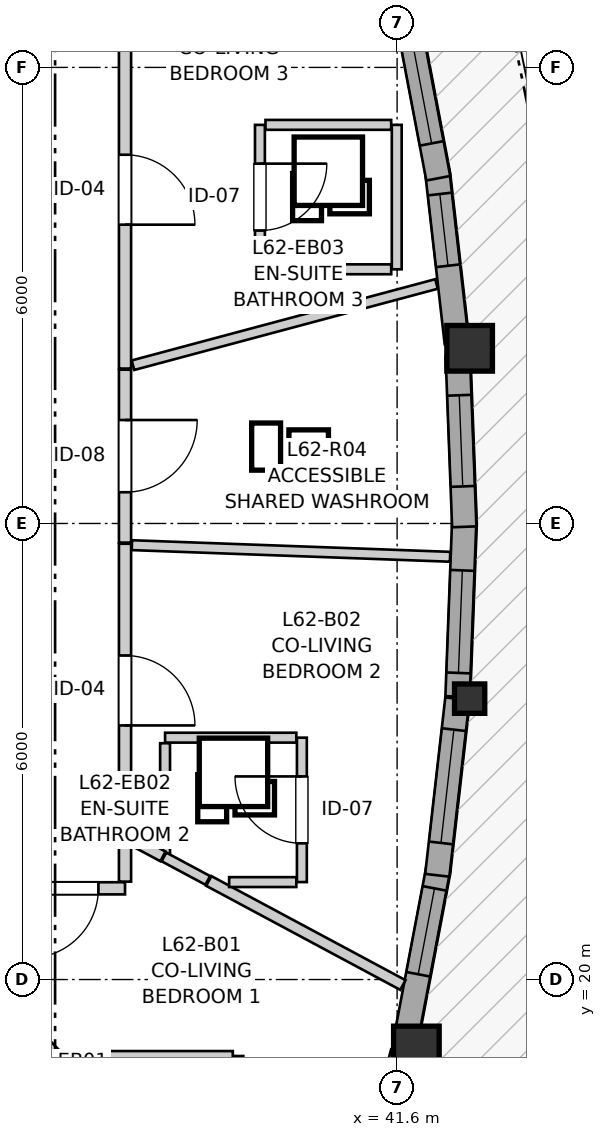
"""IFC4 building model, lengths in metres.
Left out: names, types, materials, properties, quantities, classifications, styles, units other than length and angle.
Written with IfcOpenShell. Run it as: python <this file> out.ifc"""

import sys

from ifc_helpers import new_model, si_unit, direction, frame, frame_2d, origin, origin_2d, place, context, subcontext, project, spatial, rectangle, i_section, extrude, source, transform, mapped, element, fill, save


model = new_model("IFC4")
c1 = context("Model", 3, precision=1e-05, world=origin(), true_north=direction((0.0, 1.0)))
c2 = subcontext(c1, "Body", "Model", "MODEL_VIEW")
j1 = project(units=[si_unit("LENGTHUNIT", "METRE"), si_unit("PLANEANGLEUNIT", "RADIAN")], contexts=[c1])
p1 = place(None, origin())
s1 = spatial("IfcSite", under=j1, at=p1, CompositionType="ELEMENT")
p2 = place(p1, origin())
s2 = spatial("IfcBuilding", under=s1, at=p2, CompositionType="ELEMENT")
p3 = place(p2, frame((0.0, 0.0, 208.4)))
s3 = spatial("IfcBuildingStorey", under=s2, at=p3, CompositionType="ELEMENT", Elevation=208.4)
m1 = source(origin(), c2, "Body", "SweptSolid", [
    extrude(rectangle(XDim=0.6, YDim=0.6, at=origin_2d()), origin(), (0.0, 0.0, 1.0), 2.935),
])
p4 = place(p3, frame((41.854, 19.086, 0.0), z_axis=(0.0, 0.0, 1.0), x_axis=(1.0, 0.0, 0.0)))
e1 = element("IfcColumn", 1, at=p4, inside=s3, PredefinedType="COLUMN", context=c2, shape_type="MappedRepresentation", body=[
    mapped(m1, transform((0.0, 0.0, 0.0), x_axis=(1.0, 0.0, 0.0), y_axis=(0.0, 1.0, 0.0), z_axis=(0.0, 0.0, 1.0), scale=1.0)),
])
m2 = source(origin(), c2, "Body", "SweptSolid", [
    extrude(i_section(OverallWidth=0.398, OverallDepth=0.387, WebThickness=0.019, FlangeThickness=0.03, FilletRadius=0.015, at=origin_2d()), origin(), (0.0, 0.0, 1.0), 2.935),
])
p5 = place(p3, frame((42.554, 23.696, 0.0), z_axis=(0.0, 0.0, 1.0), x_axis=(1.0, 0.0, 0.0)))
e2 = element("IfcColumn", 2, at=p5, inside=s3, PredefinedType="PILASTER", context=c2, shape_type="MappedRepresentation", body=[
    mapped(m2, transform((0.0, 0.0, 0.0), x_axis=(1.0, 0.0, 0.0), y_axis=(0.0, 1.0, 0.0), z_axis=(0.0, 0.0, 1.0), scale=1.0)),
])
p6 = place(p3, frame((42.554, 28.304, 0.0), z_axis=(0.0, 0.0, 1.0), x_axis=(1.0, 0.0, 0.0)))
e3 = element("IfcColumn", 3, at=p6, inside=s3, PredefinedType="COLUMN", context=c2, shape_type="MappedRepresentation", body=[
    mapped(m1, transform((0.0, 0.0, 0.0), x_axis=(1.0, 0.0, 0.0), y_axis=(0.0, 1.0, 0.0), z_axis=(0.0, 0.0, 1.0), scale=1.0)),
])
p7 = place(p3, frame((41.076, 16.786, 0.0), z_axis=(0.0, 0.0, 1.0), x_axis=(0.257037260973, 0.966401493413, 0.0)))
e4 = element("IfcWall", 4, at=p7, inside=s3, PredefinedType="SOLIDWALL", context=c2, shape_type="SweptSolid", body=[
    extrude(rectangle(XDim=2.333, YDim=0.32, at=frame_2d((1.167, 0.0))), origin(), (0.0, 0.0, 1.0), 2.555),
])
p8 = place(p7, frame((0.446, 0.0, 0.82)))
e5 = element("IfcOpeningElement", 5, at=p8, cuts=e4, PredefinedType="OPENING", context=c2, shape_type="SweptSolid", body=[
    extrude(rectangle(XDim=1.45, YDim=1.25, at=frame_2d((0.725, 0.625))), frame((0.0, 0.17, 0.0), z_axis=(0.0, -1.0, 0.0), x_axis=(1.0, 0.0, 0.0)), (0.0, 0.0, 1.0), 0.34),
])
p9 = place(p3, frame((41.713, 19.205, 0.0), z_axis=(0.0, 0.0, 1.0), x_axis=(0.186691464441, 0.982418595663, 0.0)))
e6 = element("IfcWall", 6, at=p9, inside=s3, PredefinedType="SOLIDWALL", context=c2, shape_type="SweptSolid", body=[
    extrude(rectangle(XDim=2.294, YDim=0.32, at=frame_2d((1.147, 0.0))), origin(), (0.0, 0.0, 1.0), 2.555),
])
p10 = place(p9, frame((0.88, 0.0, 0.82)))
e7 = element("IfcOpeningElement", 7, at=p10, cuts=e6, PredefinedType="OPENING", context=c2, shape_type="SweptSolid", body=[
    extrude(rectangle(XDim=1.15, YDim=1.2, at=frame_2d((0.575, 0.6))), frame((0.0, 0.17, 0.0), z_axis=(0.0, -1.0, 0.0), x_axis=(1.0, 0.0, 0.0)), (0.0, 0.0, 1.0), 0.34),
])
p11 = place(p3, frame((42.128, 21.371, 0.0), z_axis=(0.0, 0.0, 1.0), x_axis=(0.113319777802, 0.993558567956, 0.0)))
e8 = element("IfcWall", 8, at=p11, inside=s3, PredefinedType="SOLIDWALL", context=c2, shape_type="SweptSolid", body=[
    extrude(rectangle(XDim=2.338, YDim=0.32, at=frame_2d((1.169, 0.0))), origin(), (0.0, 0.0, 1.0), 2.555),
])
p12 = place(p11, frame((0.429, 0.0, 0.82)))
e9 = element("IfcOpeningElement", 9, at=p12, cuts=e8, PredefinedType="OPENING", context=c2, shape_type="SweptSolid", body=[
    extrude(rectangle(XDim=1.5, YDim=1.45, at=frame_2d((0.75, 0.725))), frame((0.0, 0.17, 0.0), z_axis=(0.0, -1.0, 0.0), x_axis=(1.0, 0.0, 0.0)), (0.0, 0.0, 1.0), 0.34),
])
p13 = place(p3, frame((42.395, 23.722, 0.0), z_axis=(0.0, 0.0, 1.0), x_axis=(0.038025668885, 0.999276762717, 0.0)))
e10 = element("IfcWall", 10, at=p13, inside=s3, PredefinedType="SOLIDWALL", context=c2, shape_type="SweptSolid", body=[
    extrude(rectangle(XDim=2.324, YDim=0.32, at=frame_2d((1.162, 0.0))), origin(), (0.0, 0.0, 1.0), 2.555),
])
p14 = place(p13, frame((0.312, 0.0, 0.82)))
e11 = element("IfcOpeningElement", 11, at=p14, cuts=e10, PredefinedType="OPENING", context=c2, shape_type="SweptSolid", body=[
    extrude(rectangle(XDim=1.35, YDim=1.45, at=frame_2d((0.675, 0.725))), frame((0.0, 0.17, 0.0), z_axis=(0.0, -1.0, 0.0), x_axis=(1.0, 0.0, 0.0)), (0.0, 0.0, 1.0), 0.34),
])
p15 = place(p3, frame((42.483, 25.956, 0.0), z_axis=(0.0, 0.0, 1.0), x_axis=(-0.038013039165, 0.999277243238, 0.0)))
e12 = element("IfcWall", 12, at=p15, inside=s3, PredefinedType="SOLIDWALL", context=c2, shape_type="SweptSolid", body=[
    extrude(rectangle(XDim=2.254, YDim=0.32, at=frame_2d((1.127, 0.0))), origin(), (0.0, 0.0, 1.0), 2.555),
])
p16 = place(p15, frame((0.532, 0.0, 0.82)))
e13 = element("IfcOpeningElement", 13, at=p16, cuts=e12, PredefinedType="OPENING", context=c2, shape_type="SweptSolid", body=[
    extrude(rectangle(XDim=1.2, YDim=1.45, at=frame_2d((0.6, 0.725))), frame((0.0, 0.17, 0.0), z_axis=(0.0, -1.0, 0.0), x_axis=(1.0, 0.0, 0.0)), (0.0, 0.0, 1.0), 0.34),
])
p17 = place(p3, frame((42.385, 28.376, 0.0), z_axis=(0.0, 0.0, 1.0), x_axis=(-0.113267221285, 0.993564560853, 0.0)))
e14 = element("IfcWall", 14, at=p17, inside=s3, PredefinedType="SOLIDWALL", context=c2, shape_type="SweptSolid", body=[
    extrude(rectangle(XDim=2.268, YDim=0.32, at=frame_2d((1.134, 0.0))), origin(), (0.0, 0.0, 1.0), 2.555),
])
p18 = place(p17, frame((1.021, 0.0, 0.82)))
e15 = element("IfcOpeningElement", 15, at=p18, cuts=e14, PredefinedType="OPENING", context=c2, shape_type="SweptSolid", body=[
    extrude(rectangle(XDim=0.95, YDim=1.35, at=frame_2d((0.475, 0.675))), frame((0.0, 0.17, 0.0), z_axis=(0.0, -1.0, 0.0), x_axis=(1.0, 0.0, 0.0)), (0.0, 0.0, 1.0), 0.34),
])
p19 = place(p3, frame((42.141, 30.542, 0.0), z_axis=(0.0, 0.0, 1.0), x_axis=(-0.186632734065, 0.982429754525, 0.0)))
e16 = element("IfcWall", 16, at=p19, inside=s3, PredefinedType="SOLIDWALL", context=c2, shape_type="SweptSolid", body=[
    extrude(rectangle(XDim=2.364, YDim=0.32, at=frame_2d((1.182, 0.0))), origin(), (0.0, 0.0, 1.0), 2.555),
])
p20 = place(p19, frame((0.467, 0.0, 0.82)))
e17 = element("IfcOpeningElement", 17, at=p20, cuts=e16, PredefinedType="OPENING", context=c2, shape_type="SweptSolid", body=[
    extrude(rectangle(XDim=1.45, YDim=1.25, at=frame_2d((0.725, 0.625))), frame((0.0, 0.17, 0.0), z_axis=(0.0, -1.0, 0.0), x_axis=(1.0, 0.0, 0.0)), (0.0, 0.0, 1.0), 0.34),
])
p21 = place(p3, frame((38.02, 32.748, 0.0), z_axis=(0.0, 0.0, 1.0), x_axis=(0.0, -1.0, 0.0)))
e18 = element("IfcWall", 18, at=p21, inside=s3, PredefinedType="PARTITIONING", context=c2, shape_type="SweptSolid", body=[
    extrude(rectangle(XDim=4.71, YDim=0.16, at=frame_2d((2.355, 0.0))), origin(), (0.0, 0.0, 1.0), 2.603),
])
p22 = place(p21, frame((1.897, 0.0, 0.0)))
e19 = element("IfcOpeningElement", 19, at=p22, cuts=e18, PredefinedType="OPENING", context=c2, shape_type="SweptSolid", body=[
    extrude(rectangle(XDim=0.92, YDim=2.1, at=frame_2d((0.46, 1.05))), frame((0.0, 0.09, 0.0), z_axis=(0.0, -1.0, 0.0), x_axis=(1.0, 0.0, 0.0)), (0.0, 0.0, 1.0), 0.18),
])
p23 = place(p3, frame((38.02, 25.733, 0.0), z_axis=(0.0, 0.0, 1.0), x_axis=(0.0, -1.0, 0.0)))
e20 = element("IfcWall", 20, at=p23, inside=s3, PredefinedType="PARTITIONING", context=c2, shape_type="SweptSolid", body=[
    extrude(rectangle(XDim=3.862, YDim=0.16, at=frame_2d((1.931, 0.0))), origin(), (0.0, 0.0, 1.0), 2.935),
])
p24 = place(p23, frame((1.47, 0.0, 0.0)))
e21 = element("IfcOpeningElement", 21, at=p24, cuts=e20, PredefinedType="OPENING", context=c2, shape_type="SweptSolid", body=[
    extrude(rectangle(XDim=0.92, YDim=2.1, at=frame_2d((0.46, 1.05))), frame((0.0, 0.09, 0.0), z_axis=(0.0, -1.0, 0.0), x_axis=(1.0, 0.0, 0.0)), (0.0, 0.0, 1.0), 0.18),
])
p25 = place(p3, frame((38.02, 28.023, 0.0), z_axis=(0.0, 0.0, 1.0), x_axis=(0.0, -1.0, 0.0)))
e22 = element("IfcWall", 22, at=p25, inside=s3, PredefinedType="PARTITIONING", context=c2, shape_type="SweptSolid", body=[
    extrude(rectangle(XDim=2.275, YDim=0.16, at=frame_2d((1.137, 0.0))), origin(), (0.0, 0.0, 1.0), 2.935),
])
p26 = place(p25, frame((0.662, 0.0, 0.0)))
e23 = element("IfcOpeningElement", 23, at=p26, cuts=e22, PredefinedType="OPENING", context=c2, shape_type="SweptSolid", body=[
    extrude(rectangle(XDim=0.95, YDim=2.1, at=frame_2d((0.475, 1.05))), frame((0.0, 0.09, 0.0), z_axis=(0.0, -1.0, 0.0), x_axis=(1.0, 0.0, 0.0)), (0.0, 0.0, 1.0), 0.18),
])
p27 = place(p3, frame((39.511, 17.094, 0.0), z_axis=(0.0, 0.0, 1.0), x_axis=(0.0, 1.0, 0.0)))
e24 = element("IfcWall", 24, at=p27, inside=s3, PredefinedType="PARTITIONING", context=c2, shape_type="SweptSolid", body=[
    extrude(rectangle(XDim=1.9, YDim=0.13, at=frame_2d((0.95, 0.0))), origin(), (0.0, 0.0, 1.0), 2.935),
])
p28 = place(p27, frame((0.51, 0.0, 0.0)))
e25 = element("IfcOpeningElement", 25, at=p28, cuts=e24, PredefinedType="OPENING", context=c2, shape_type="SweptSolid", body=[
    extrude(rectangle(XDim=0.88, YDim=2.05, at=frame_2d((0.44, 1.025))), frame((0.0, 0.075, 0.0), z_axis=(0.0, -1.0, 0.0), x_axis=(1.0, 0.0, 0.0)), (0.0, 0.0, 1.0), 0.15),
])
p29 = place(p3, frame((40.347, 21.282, 0.0), z_axis=(0.0, 0.0, 1.0), x_axis=(0.0, 1.0, 0.0)))
e26 = element("IfcWall", 26, at=p29, inside=s3, PredefinedType="PARTITIONING", context=c2, shape_type="SweptSolid", body=[
    extrude(rectangle(XDim=1.9, YDim=0.13, at=frame_2d((0.95, 0.0))), origin(), (0.0, 0.0, 1.0), 2.573),
])
p30 = place(p29, frame((0.51, 0.0, 0.0)))
e27 = element("IfcOpeningElement", 27, at=p30, cuts=e26, PredefinedType="OPENING", context=c2, shape_type="SweptSolid", body=[
    extrude(rectangle(XDim=0.88, YDim=2.05, at=frame_2d((0.44, 1.025))), frame((0.0, 0.075, 0.0), z_axis=(0.0, -1.0, 0.0), x_axis=(1.0, 0.0, 0.0)), (0.0, 0.0, 1.0), 0.15),
])
p31 = place(p3, frame((39.795, 31.244, 0.0), z_axis=(0.0, 0.0, 1.0), x_axis=(0.0, -1.0, 0.0)))
e28 = element("IfcWall", 28, at=p31, inside=s3, PredefinedType="PARTITIONING", context=c2, shape_type="SweptSolid", body=[
    extrude(rectangle(XDim=1.9, YDim=0.13, at=frame_2d((0.95, 0.0))), origin(), (0.0, 0.0, 1.0), 2.573),
])
p32 = place(p31, frame((0.51, 0.0, 0.0)))
e29 = element("IfcOpeningElement", 29, at=p32, cuts=e28, PredefinedType="OPENING", context=c2, shape_type="SweptSolid", body=[
    extrude(rectangle(XDim=0.88, YDim=2.05, at=frame_2d((0.44, 1.025))), frame((0.0, 0.075, 0.0), z_axis=(0.0, -1.0, 0.0), x_axis=(1.0, 0.0, 0.0)), (0.0, 0.0, 1.0), 0.15),
])
p33 = place(p3, frame((38.02, 21.2, 0.0), z_axis=(0.0, 0.0, 1.0), x_axis=(-1.0, 0.0, 0.0)))
e30 = element("IfcWall", 30, at=p33, inside=s3, PredefinedType="PARTITIONING", context=c2, shape_type="SweptSolid", body=[
    extrude(rectangle(XDim=1.612, YDim=0.16, at=frame_2d((0.806, 0.0))), origin(), (0.0, 0.0, 1.0), 2.935),
])
p34 = place(p33, frame((0.35, 0.0, 0.0)))
e31 = element("IfcOpeningElement", 31, at=p34, cuts=e30, PredefinedType="OPENING", context=c2, shape_type="SweptSolid", body=[
    extrude(rectangle(XDim=0.92, YDim=2.1, at=frame_2d((0.46, 1.05))), frame((0.0, 0.09, 0.0), z_axis=(0.0, -1.0, 0.0), x_axis=(1.0, 0.0, 0.0)), (0.0, 0.0, 1.0), 0.18),
])
p35 = place(p3, frame((38.11, 25.715, 0.0), z_axis=(0.0, 0.0, 1.0), x_axis=(0.99933433165, -0.036481414253, 0.0)))
e32 = element("IfcWall", 32, at=p35, inside=s3, PredefinedType="PARTITIONING", context=c2, shape_type="SweptSolid", body=[
    extrude(rectangle(XDim=4.189, YDim=0.13, at=frame_2d((2.095, 0.0))), origin(), (0.0, 0.0, 1.0), 2.935),
])
p36 = place(p3, frame((38.125, 28.082, 0.0), z_axis=(0.0, 0.0, 1.0), x_axis=(0.965997321458, 0.258552073934, 0.0)))
e33 = element("IfcWall", 33, at=p36, inside=s3, PredefinedType="PARTITIONING", context=c2, shape_type="SweptSolid", body=[
    extrude(rectangle(XDim=4.134, YDim=0.13, at=frame_2d((2.067, 0.0))), origin(), (0.0, 0.0, 1.0), 2.935),
])
p37 = place(p3, frame((39.122, 21.297, 0.0), z_axis=(0.0, 0.0, 1.0), x_axis=(0.881308328415, -0.472541670402, 0.0)))
e34 = element("IfcWall", 34, at=p37, inside=s3, PredefinedType="PARTITIONING", context=c2, shape_type="SweptSolid", body=[
    extrude(rectangle(XDim=2.898, YDim=0.145, at=frame_2d((1.449, 0.0))), origin(), (0.0, 0.0, 1.0), 2.935),
])
p38 = place(p3, frame((36.458, 19.686, 0.0), z_axis=(0.0, 0.0, 1.0), x_axis=(0.695231916786, -0.718785490868, 0.0)))
e35 = element("IfcWall", 35, at=p38, inside=s3, PredefinedType="PARTITIONING", context=c2, shape_type="SweptSolid", body=[
    extrude(rectangle(XDim=1.824, YDim=0.145, at=frame_2d((0.912, 0.0))), origin(), (0.0, 0.0, 1.0), 2.935),
])
p39 = place(p3, frame((41.595, 29.344, 0.0), z_axis=(0.0, 0.0, 1.0), x_axis=(0.0, 1.0, 0.0)))
e36 = element("IfcWall", 36, at=p39, inside=s3, PredefinedType="PARTITIONING", context=c2, shape_type="SweptSolid", body=[
    extrude(rectangle(XDim=1.9, YDim=0.13, at=frame_2d((0.95, 0.0))), origin(), (0.0, 0.0, 1.0), 2.935),
])
p40 = place(p3, frame((37.711, 18.994, 0.0), z_axis=(0.0, 0.0, 1.0), x_axis=(1.0, 0.0, 0.0)))
e37 = element("IfcWall", 37, at=p40, inside=s3, PredefinedType="PARTITIONING", context=c2, shape_type="SweptSolid", body=[
    extrude(rectangle(XDim=1.727, YDim=0.13, at=frame_2d((0.864, 0.0))), origin(), (0.0, 0.0, 1.0), 2.935),
])
p41 = place(p3, frame((38.547, 23.182, 0.0), z_axis=(0.0, 0.0, 1.0), x_axis=(1.0, 0.0, 0.0)))
e38 = element("IfcWall", 38, at=p41, inside=s3, PredefinedType="PARTITIONING", context=c2, shape_type="SweptSolid", body=[
    extrude(rectangle(XDim=1.727, YDim=0.13, at=frame_2d((0.863, 0.0))), origin(), (0.0, 0.0, 1.0), 2.935),
])
for number, where, z_axis, x_axis in (
    (39, (39.868, 31.244, 0.0), (0.0, 0.0, 1.0), (1.0, 0.0, 0.0)),
    (40, (39.868, 29.344, 0.0), (0.0, 0.0, 1.0), (1.0, 0.0, 0.0)),
):
    element("IfcWall", number, at=place(p3, frame(where, z_axis=z_axis, x_axis=x_axis)), inside=s3, PredefinedType="PARTITIONING", context=c2, shape_type="SweptSolid", body=[
        extrude(rectangle(XDim=1.654, YDim=0.13, at=frame_2d((0.827, 0.0))), origin(), (0.0, 0.0, 1.0), 2.935),
    ])
p42 = place(p3, frame((38.547, 21.605, 0.0), z_axis=(0.0, 0.0, 1.0), x_axis=(0.0, 1.0, 0.0)))
e41 = element("IfcWall", 41, at=p42, inside=s3, PredefinedType="PARTITIONING", context=c2, shape_type="SweptSolid", body=[
    extrude(rectangle(XDim=1.504, YDim=0.13, at=frame_2d((0.752, 0.0))), origin(), (0.0, 0.0, 1.0), 2.603),
])
p43 = place(p3, frame((39.39, 21.282, 0.0), z_axis=(0.0, 0.0, 1.0), x_axis=(1.0, 0.0, 0.0)))
e42 = element("IfcWall", 42, at=p43, inside=s3, PredefinedType="PARTITIONING", context=c2, shape_type="SweptSolid", body=[
    extrude(rectangle(XDim=0.884, YDim=0.13, at=frame_2d((0.442, 0.0))), origin(), (0.0, 0.0, 1.0), 2.935),
])
p44 = place(p3, frame((38.02, 21.288, 0.0), z_axis=(0.0, 0.0, 1.0), x_axis=(0.0, 1.0, 0.0)))
e43 = element("IfcWall", 43, at=p44, inside=s3, PredefinedType="PARTITIONING", context=c2, shape_type="SweptSolid", body=[
    extrude(rectangle(XDim=0.568, YDim=0.16, at=frame_2d((0.284, 0.0))), origin(), (0.0, 0.0, 1.0), 2.935),
])
p45 = place(p3, frame((38.532, 21.613, 0.0), z_axis=(0.0, 0.0, 1.0), x_axis=(0.881618593919, -0.471962556626, 0.0)))
e44 = element("IfcWall", 44, at=p45, inside=s3, PredefinedType="PARTITIONING", context=c2, shape_type="SweptSolid", body=[
    extrude(rectangle(XDim=0.654, YDim=0.13, at=frame_2d((0.327, 0.0))), origin(), (0.0, 0.0, 1.0), 2.935),
])
p46 = place(p3, frame((38.06, 21.867, 0.0), z_axis=(0.0, 0.0, 1.0), x_axis=(0.881026965879, -0.473066047601, 0.0)))
e45 = element("IfcWall", 45, at=p46, inside=s3, PredefinedType="PARTITIONING", context=c2, shape_type="SweptSolid", body=[
    extrude(rectangle(XDim=0.521, YDim=0.145, at=frame_2d((0.261, 0.0))), origin(), (0.0, 0.0, 1.0), 2.935),
])
m3 = source(origin(), c2, "Body", "SweptSolid", [
    extrude(rectangle(XDim=1.15, YDim=1.2, at=frame_2d((0.575, 0.6))), frame((0.0, 0.03, 0.0), z_axis=(0.0, -1.0, 0.0), x_axis=(1.0, 0.0, 0.0)), (0.0, 0.0, 1.0), 0.06),
])
p47 = place(p10, origin())
e46 = element("IfcWindow", 46, at=p47, inside=s3, PartitioningType="SINGLE_PANEL", PredefinedType="WINDOW", context=c2, shape_type="MappedRepresentation", body=[
    mapped(m3, transform((0.0, 0.0, 0.0), x_axis=(1.0, 0.0, 0.0), y_axis=(0.0, 1.0, 0.0), z_axis=(0.0, 0.0, 1.0), scale=1.0)),
])
fill(e7, e46)
m4 = source(origin(), c2, "Body", "SweptSolid", [
    extrude(rectangle(XDim=1.5, YDim=1.45, at=frame_2d((0.75, 0.725))), frame((0.0, 0.03, 0.0), z_axis=(0.0, -1.0, 0.0), x_axis=(1.0, 0.0, 0.0)), (0.0, 0.0, 1.0), 0.06),
])
p48 = place(p12, origin())
e47 = element("IfcWindow", 47, at=p48, inside=s3, PartitioningType="SINGLE_PANEL", PredefinedType="WINDOW", context=c2, shape_type="MappedRepresentation", body=[
    mapped(m4, transform((0.0, 0.0, 0.0), x_axis=(1.0, 0.0, 0.0), y_axis=(0.0, 1.0, 0.0), z_axis=(0.0, 0.0, 1.0), scale=1.0)),
])
fill(e9, e47)
m5 = source(origin(), c2, "Body", "SweptSolid", [
    extrude(rectangle(XDim=1.35, YDim=1.45, at=frame_2d((0.675, 0.725))), frame((0.0, 0.03, 0.0), z_axis=(0.0, -1.0, 0.0), x_axis=(1.0, 0.0, 0.0)), (0.0, 0.0, 1.0), 0.06),
])
p49 = place(p14, origin())
e48 = element("IfcWindow", 48, at=p49, inside=s3, PartitioningType="SINGLE_PANEL", PredefinedType="WINDOW", context=c2, shape_type="MappedRepresentation", body=[
    mapped(m5, transform((0.0, 0.0, 0.0), x_axis=(1.0, 0.0, 0.0), y_axis=(0.0, 1.0, 0.0), z_axis=(0.0, 0.0, 1.0), scale=1.0)),
])
fill(e11, e48)
m6 = source(origin(), c2, "Body", "SweptSolid", [
    extrude(rectangle(XDim=1.2, YDim=1.45, at=frame_2d((0.6, 0.725))), frame((0.0, 0.03, 0.0), z_axis=(0.0, -1.0, 0.0), x_axis=(1.0, 0.0, 0.0)), (0.0, 0.0, 1.0), 0.06),
])
p50 = place(p16, origin())
e49 = element("IfcWindow", 49, at=p50, inside=s3, PartitioningType="SINGLE_PANEL", PredefinedType="WINDOW", context=c2, shape_type="MappedRepresentation", body=[
    mapped(m6, transform((0.0, 0.0, 0.0), x_axis=(1.0, 0.0, 0.0), y_axis=(0.0, 1.0, 0.0), z_axis=(0.0, 0.0, 1.0), scale=1.0)),
])
fill(e13, e49)
m7 = source(origin(), c2, "Body", "SweptSolid", [
    extrude(rectangle(XDim=0.95, YDim=1.35, at=frame_2d((0.475, 0.675))), frame((0.0, 0.03, 0.0), z_axis=(0.0, -1.0, 0.0), x_axis=(1.0, 0.0, 0.0)), (0.0, 0.0, 1.0), 0.06),
])
p51 = place(p18, origin())
e50 = element("IfcWindow", 50, at=p51, inside=s3, PartitioningType="SINGLE_PANEL", PredefinedType="WINDOW", context=c2, shape_type="MappedRepresentation", body=[
    mapped(m7, transform((0.0, 0.0, 0.0), x_axis=(1.0, 0.0, 0.0), y_axis=(0.0, 1.0, 0.0), z_axis=(0.0, 0.0, 1.0), scale=1.0)),
])
fill(e15, e50)
m8 = source(origin(), c2, "Body", "SweptSolid", [
    extrude(rectangle(XDim=1.45, YDim=1.25, at=frame_2d((0.725, 0.625))), frame((0.0, 0.03, 0.0), z_axis=(0.0, -1.0, 0.0), x_axis=(1.0, 0.0, 0.0)), (0.0, 0.0, 1.0), 0.06),
])
p52 = place(p20, origin())
e51 = element("IfcWindow", 51, at=p52, inside=s3, PartitioningType="SINGLE_PANEL", PredefinedType="WINDOW", context=c2, shape_type="MappedRepresentation", body=[
    mapped(m8, transform((0.0, 0.0, 0.0), x_axis=(1.0, 0.0, 0.0), y_axis=(0.0, 1.0, 0.0), z_axis=(0.0, 0.0, 1.0), scale=1.0)),
])
fill(e17, e51)
m9 = source(origin(), c2, "Body", "SweptSolid", [
    extrude(rectangle(XDim=0.92, YDim=2.1, at=frame_2d((0.46, 1.05))), frame((0.0, 0.025, 0.0), z_axis=(0.0, -1.0, 0.0), x_axis=(1.0, 0.0, 0.0)), (0.0, 0.0, 1.0), 0.05),
])
p53 = place(p22, origin())
e52 = element("IfcDoor", 52, at=p53, inside=s3, OperationType="SINGLE_SWING_RIGHT", PredefinedType="DOOR", context=c2, shape_type="MappedRepresentation", body=[
    mapped(m9, transform((0.0, 0.0, 0.0), x_axis=(1.0, 0.0, 0.0), y_axis=(0.0, 1.0, 0.0), z_axis=(0.0, 0.0, 1.0), scale=1.0)),
])
fill(e19, e52)
p54 = place(p24, origin())
e53 = element("IfcDoor", 53, at=p54, inside=s3, OperationType="SINGLE_SWING_RIGHT", PredefinedType="DOOR", context=c2, shape_type="MappedRepresentation", body=[
    mapped(m9, transform((0.0, 0.0, 0.0), x_axis=(1.0, 0.0, 0.0), y_axis=(0.0, 1.0, 0.0), z_axis=(0.0, 0.0, 1.0), scale=1.0)),
])
fill(e21, e53)
m10 = source(origin(), c2, "Body", "SweptSolid", [
    extrude(rectangle(XDim=0.95, YDim=2.1, at=frame_2d((0.475, 1.05))), frame((0.0, 0.025, 0.0), z_axis=(0.0, -1.0, 0.0), x_axis=(1.0, 0.0, 0.0)), (0.0, 0.0, 1.0), 0.05),
])
p55 = place(p26, origin())
e54 = element("IfcDoor", 54, at=p55, inside=s3, OperationType="SINGLE_SWING_LEFT", PredefinedType="DOOR", context=c2, shape_type="MappedRepresentation", body=[
    mapped(m10, transform((0.0, 0.0, 0.0), x_axis=(1.0, 0.0, 0.0), y_axis=(0.0, 1.0, 0.0), z_axis=(0.0, 0.0, 1.0), scale=1.0)),
])
fill(e23, e54)
m11 = source(origin(), c2, "Body", "SweptSolid", [
    extrude(rectangle(XDim=0.88, YDim=2.05, at=frame_2d((0.44, 1.025))), frame((0.0, 0.025, 0.0), z_axis=(0.0, -1.0, 0.0), x_axis=(1.0, 0.0, 0.0)), (0.0, 0.0, 1.0), 0.05),
])
p56 = place(p30, origin())
e55 = element("IfcDoor", 55, at=p56, inside=s3, OperationType="SINGLE_SWING_RIGHT", PredefinedType="DOOR", context=c2, shape_type="MappedRepresentation", body=[
    mapped(m11, transform((0.0, 0.0, 0.0), x_axis=(1.0, 0.0, 0.0), y_axis=(0.0, 1.0, 0.0), z_axis=(0.0, 0.0, 1.0), scale=1.0)),
])
fill(e27, e55)
p57 = place(p32, origin())
e56 = element("IfcDoor", 56, at=p57, inside=s3, OperationType="SINGLE_SWING_LEFT", PredefinedType="DOOR", context=c2, shape_type="MappedRepresentation", body=[
    mapped(m11, transform((0.0, 0.0, 0.0), x_axis=(1.0, 0.0, 0.0), y_axis=(0.0, 1.0, 0.0), z_axis=(0.0, 0.0, 1.0), scale=1.0)),
])
fill(e29, e56)
p58 = place(p34, origin())
e57 = element("IfcDoor", 57, at=p58, inside=s3, OperationType="SINGLE_SWING_RIGHT", PredefinedType="DOOR", context=c2, shape_type="MappedRepresentation", body=[
    mapped(m9, transform((0.0, 0.0, 0.0), x_axis=(1.0, 0.0, 0.0), y_axis=(0.0, 1.0, 0.0), z_axis=(0.0, 0.0, 1.0), scale=1.0)),
])
fill(e31, e57)
save(model, sys.argv[1])
